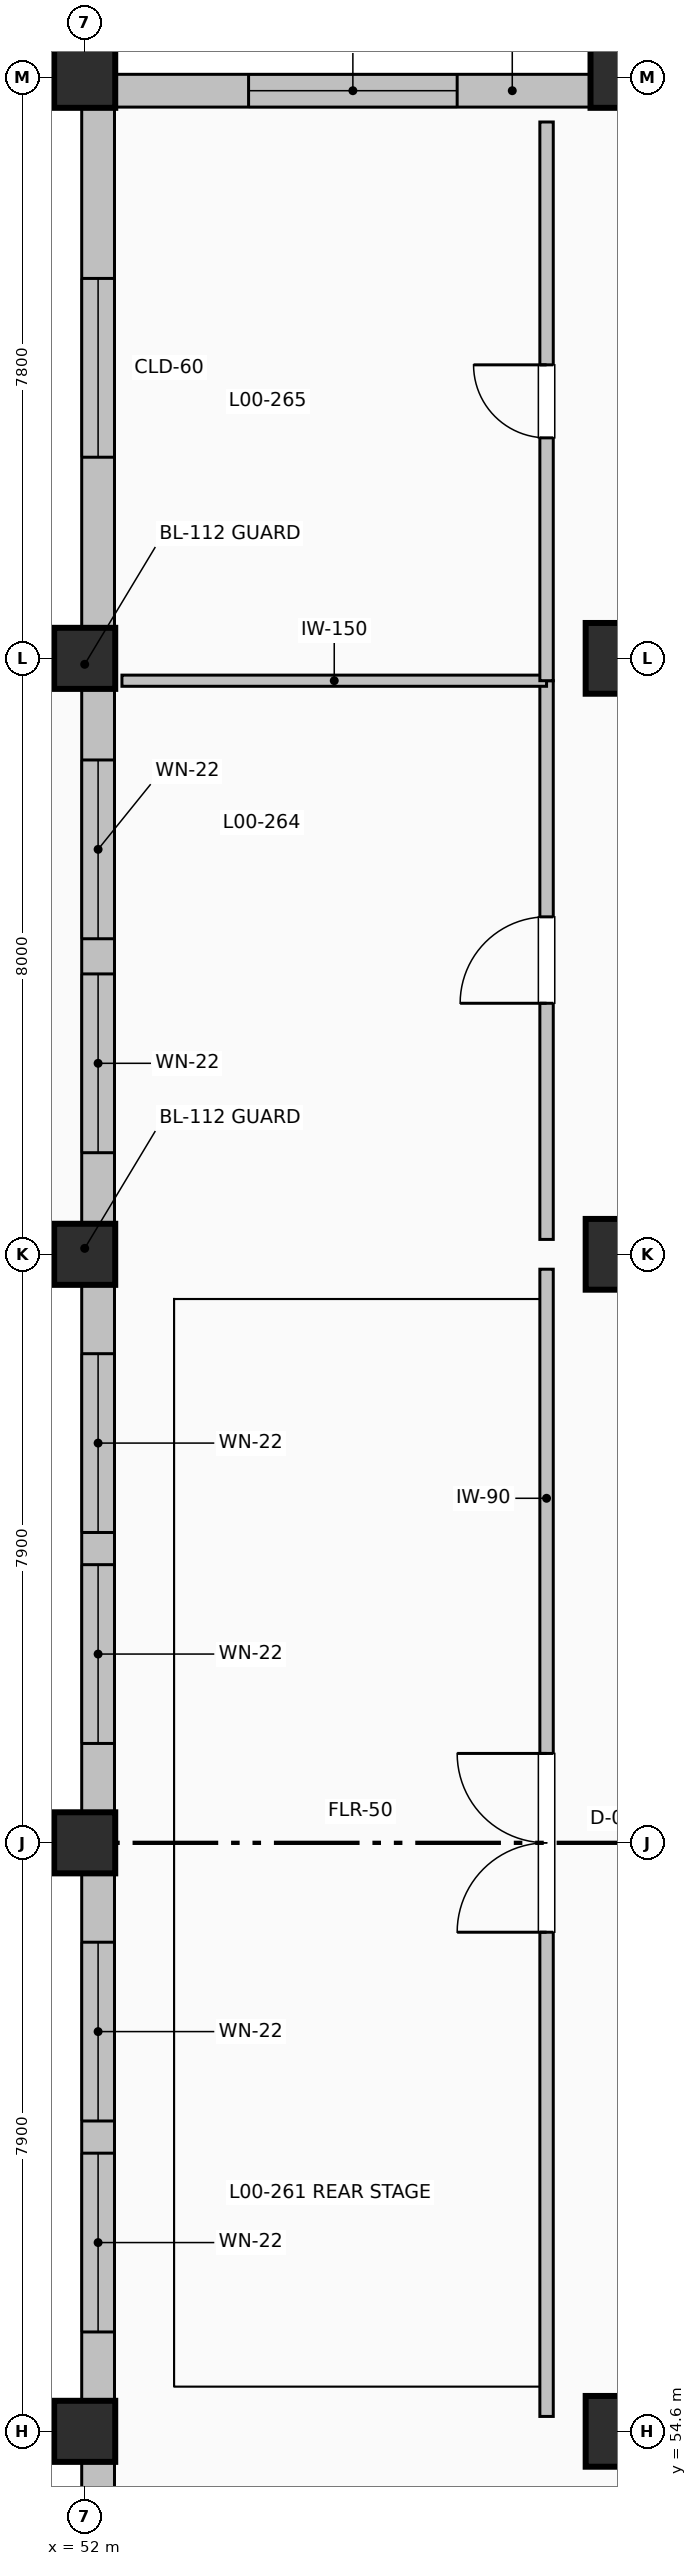
"""IFC4 building model, lengths in metres.
Left out: names, types, materials, properties, quantities, classifications, styles, units other than length and angle.
Written with IfcOpenShell. Run it as: python <this file> out.ifc"""

import sys

from ifc_helpers import new_model, si_unit, direction, frame, frame_2d, origin, origin_2d, place, context, subcontext, project, spatial, rectangle, extrude, element, fill, save


model = new_model("IFC4")
c1 = context("Model", 3, precision=1e-05, world=origin(), true_north=direction((0.0, 1.0)))
c2 = subcontext(c1, "Body", "Model", "MODEL_VIEW")
j1 = project(units=[si_unit("LENGTHUNIT", "METRE"), si_unit("PLANEANGLEUNIT", "RADIAN")], contexts=[c1])
p1 = place(None, origin())
s1 = spatial("IfcSite", under=j1, at=p1, CompositionType="ELEMENT")
p2 = place(p1, origin())
s2 = spatial("IfcBuilding", under=s1, at=p2, CompositionType="ELEMENT")
p3 = place(p2, origin())
s3 = spatial("IfcBuildingStorey", under=s2, at=p3, CompositionType="ELEMENT", Elevation=0.0)
for number, where, z_axis, x_axis in (
    (1, (52.0, 54.6, 0.0), (0.0, 0.0, 1.0), (1.0, 0.0, 0.0)),
    (2, (52.0, 62.5, 0.0), (0.0, 0.0, 1.0), (1.0, 0.0, 0.0)),
    (3, (52.0, 70.4, 0.0), (0.0, 0.0, 1.0), (1.0, 0.0, 0.0)),
    (4, (52.0, 78.4, 0.0), (0.0, 0.0, 1.0), (1.0, 0.0, 0.0)),
    (5, (52.0, 86.2, 0.0), (0.0, 0.0, 1.0), (1.0, 0.0, 0.0)),
):
    element("IfcColumn", number, at=place(p3, frame(where, z_axis=z_axis, x_axis=x_axis)), inside=s3, PredefinedType="COLUMN", context=c2, shape_type="SweptSolid", body=[
        extrude(rectangle(XDim=0.82, YDim=0.82, at=origin_2d()), origin(), (0.0, 0.0, 1.0), 5.4),
    ])
for number, where, z_axis, x_axis in (
    (6, (59.2, 54.6, 0.0), (0.0, 0.0, 1.0), (1.0, 0.0, 0.0)),
    (7, (59.2, 70.4, 0.0), (0.0, 0.0, 1.0), (1.0, 0.0, 0.0)),
    (8, (59.2, 78.4, 0.0), (0.0, 0.0, 1.0), (1.0, 0.0, 0.0)),
):
    element("IfcColumn", number, at=place(p3, frame(where, z_axis=z_axis, x_axis=x_axis)), inside=s3, PredefinedType="COLUMN", context=c2, shape_type="SweptSolid", body=[
        extrude(rectangle(XDim=0.95, YDim=0.95, at=origin_2d()), origin(), (0.0, 0.0, 1.0), 5.4),
    ])
p4 = place(p3, frame((59.2, 86.2, 0.0), z_axis=(0.0, 0.0, 1.0), x_axis=(1.0, 0.0, 0.0)))
e9 = element("IfcColumn", 9, at=p4, inside=s3, PredefinedType="COLUMN", context=c2, shape_type="SweptSolid", body=[
    extrude(rectangle(XDim=0.82, YDim=0.82, at=origin_2d()), origin(), (0.0, 0.0, 1.0), 5.4),
])
p5 = place(p3, frame((52.41, 86.02, 0.0), z_axis=(0.0, 0.0, 1.0), x_axis=(1.0, 0.0, 0.0)))
e10 = element("IfcWall", 10, at=p5, inside=s3, PredefinedType="SOLIDWALL", context=c2, shape_type="SweptSolid", body=[
    extrude(rectangle(XDim=6.38, YDim=0.44, at=frame_2d((3.19, 0.0))), origin(), (0.0, 0.0, 1.0), 4.342),
])
p6 = place(p5, frame((1.79, 0.0, 1.05)))
e11 = element("IfcOpeningElement", 11, at=p6, cuts=e10, PredefinedType="OPENING", context=c2, shape_type="SweptSolid", body=[
    extrude(rectangle(XDim=2.8, YDim=1.35, at=frame_2d((1.4, 0.675))), frame((0.0, 0.23, 0.0), z_axis=(0.0, -1.0, 0.0), x_axis=(1.0, 0.0, 0.0)), (0.0, 0.0, 1.0), 0.46),
])
p7 = place(p3, frame((52.18, 47.01, 0.0), z_axis=(0.0, 0.0, 1.0), x_axis=(0.0, 1.0, 0.0)))
e12 = element("IfcWall", 12, at=p7, inside=s3, PredefinedType="SOLIDWALL", context=c2, shape_type="SweptSolid", body=[
    extrude(rectangle(XDim=7.18, YDim=0.44, at=frame_2d((3.59, 0.0))), origin(), (0.0, 0.0, 1.0), 4.342),
])
p8 = place(p7, frame((2.39, 0.0, 0.0)))
e13 = element("IfcOpeningElement", 13, at=p8, cuts=e12, PredefinedType="OPENING", context=c2, shape_type="SweptSolid", body=[
    extrude(rectangle(XDim=2.4, YDim=2.4, at=frame_2d((1.2, 1.2))), frame((0.0, 0.23, 0.0), z_axis=(0.0, -1.0, 0.0), x_axis=(1.0, 0.0, 0.0)), (0.0, 0.0, 1.0), 0.46),
])
p9 = place(p3, frame((52.18, 55.01, 0.0), z_axis=(0.0, 0.0, 1.0), x_axis=(0.0, 1.0, 0.0)))
e14 = element("IfcWall", 14, at=p9, inside=s3, PredefinedType="SOLIDWALL", context=c2, shape_type="SweptSolid", body=[
    extrude(rectangle(XDim=7.08, YDim=0.44, at=frame_2d((3.54, 0.0))), origin(), (0.0, 0.0, 1.0), 4.342),
])
p10 = place(p9, frame((0.924, 0.0, 1.05)))
e15 = element("IfcOpeningElement", 15, at=p10, cuts=e14, PredefinedType="OPENING", context=c2, shape_type="SweptSolid", body=[
    extrude(rectangle(XDim=2.4, YDim=1.25, at=frame_2d((1.2, 0.625))), frame((0.0, 0.23, 0.0), z_axis=(0.0, -1.0, 0.0), x_axis=(1.0, 0.0, 0.0)), (0.0, 0.0, 1.0), 0.46),
])
p11 = place(p9, frame((3.756, 0.0, 1.05)))
e16 = element("IfcOpeningElement", 16, at=p11, cuts=e14, PredefinedType="OPENING", context=c2, shape_type="SweptSolid", body=[
    extrude(rectangle(XDim=2.4, YDim=1.25, at=frame_2d((1.2, 0.625))), frame((0.0, 0.23, 0.0), z_axis=(0.0, -1.0, 0.0), x_axis=(1.0, 0.0, 0.0)), (0.0, 0.0, 1.0), 0.46),
])
p12 = place(p3, frame((52.18, 62.91, 0.0), z_axis=(0.0, 0.0, 1.0), x_axis=(0.0, 1.0, 0.0)))
e17 = element("IfcWall", 17, at=p12, inside=s3, PredefinedType="SOLIDWALL", context=c2, shape_type="SweptSolid", body=[
    extrude(rectangle(XDim=7.08, YDim=0.44, at=frame_2d((3.54, 0.0))), origin(), (0.0, 0.0, 1.0), 4.342),
])
p13 = place(p12, frame((0.924, 0.0, 1.05)))
e18 = element("IfcOpeningElement", 18, at=p13, cuts=e17, PredefinedType="OPENING", context=c2, shape_type="SweptSolid", body=[
    extrude(rectangle(XDim=2.4, YDim=1.25, at=frame_2d((1.2, 0.625))), frame((0.0, 0.23, 0.0), z_axis=(0.0, -1.0, 0.0), x_axis=(1.0, 0.0, 0.0)), (0.0, 0.0, 1.0), 0.46),
])
p14 = place(p12, frame((3.756, 0.0, 1.05)))
e19 = element("IfcOpeningElement", 19, at=p14, cuts=e17, PredefinedType="OPENING", context=c2, shape_type="SweptSolid", body=[
    extrude(rectangle(XDim=2.4, YDim=1.25, at=frame_2d((1.2, 0.625))), frame((0.0, 0.23, 0.0), z_axis=(0.0, -1.0, 0.0), x_axis=(1.0, 0.0, 0.0)), (0.0, 0.0, 1.0), 0.46),
])
p15 = place(p3, frame((52.18, 70.81, 0.0), z_axis=(0.0, 0.0, 1.0), x_axis=(0.0, 1.0, 0.0)))
e20 = element("IfcWall", 20, at=p15, inside=s3, PredefinedType="SOLIDWALL", context=c2, shape_type="SweptSolid", body=[
    extrude(rectangle(XDim=7.18, YDim=0.44, at=frame_2d((3.59, 0.0))), origin(), (0.0, 0.0, 1.0), 4.342),
])
p16 = place(p15, frame((0.954, 0.0, 1.05)))
e21 = element("IfcOpeningElement", 21, at=p16, cuts=e20, PredefinedType="OPENING", context=c2, shape_type="SweptSolid", body=[
    extrude(rectangle(XDim=2.4, YDim=1.25, at=frame_2d((1.2, 0.625))), frame((0.0, 0.23, 0.0), z_axis=(0.0, -1.0, 0.0), x_axis=(1.0, 0.0, 0.0)), (0.0, 0.0, 1.0), 0.46),
])
p17 = place(p15, frame((3.826, 0.0, 1.05)))
e22 = element("IfcOpeningElement", 22, at=p17, cuts=e20, PredefinedType="OPENING", context=c2, shape_type="SweptSolid", body=[
    extrude(rectangle(XDim=2.4, YDim=1.25, at=frame_2d((1.2, 0.625))), frame((0.0, 0.23, 0.0), z_axis=(0.0, -1.0, 0.0), x_axis=(1.0, 0.0, 0.0)), (0.0, 0.0, 1.0), 0.46),
])
p18 = place(p3, frame((52.18, 78.81, 0.0), z_axis=(0.0, 0.0, 1.0), x_axis=(0.0, 1.0, 0.0)))
e23 = element("IfcWall", 23, at=p18, inside=s3, PredefinedType="SOLIDWALL", context=c2, shape_type="SweptSolid", body=[
    extrude(rectangle(XDim=6.98, YDim=0.44, at=frame_2d((3.49, 0.0))), origin(), (0.0, 0.0, 1.0), 4.342),
])
p19 = place(p18, frame((2.29, 0.0, 1.05)))
e24 = element("IfcOpeningElement", 24, at=p19, cuts=e23, PredefinedType="OPENING", context=c2, shape_type="SweptSolid", body=[
    extrude(rectangle(XDim=2.4, YDim=1.25, at=frame_2d((1.2, 0.625))), frame((0.0, 0.23, 0.0), z_axis=(0.0, -1.0, 0.0), x_axis=(1.0, 0.0, 0.0)), (0.0, 0.0, 1.0), 0.46),
])
p20 = place(p3, frame((58.2, 54.8, 0.0), z_axis=(0.0, 0.0, 1.0), x_axis=(0.0, 1.0, 0.0)))
e25 = element("IfcWall", 25, at=p20, inside=s3, PredefinedType="PARTITIONING", context=c2, shape_type="SweptSolid", body=[
    extrude(rectangle(XDim=15.4, YDim=0.18, at=frame_2d((7.7, 0.0))), origin(), (0.0, 0.0, 1.0), 5.092),
])
p21 = place(p20, frame((6.5, 0.0, 0.0)))
e26 = element("IfcOpeningElement", 26, at=p21, cuts=e25, PredefinedType="OPENING", context=c2, shape_type="SweptSolid", body=[
    extrude(rectangle(XDim=2.4, YDim=2.4, at=frame_2d((1.2, 1.2))), frame((0.0, 0.1, 0.0), z_axis=(0.0, -1.0, 0.0), x_axis=(1.0, 0.0, 0.0)), (0.0, 0.0, 1.0), 0.2),
])
p22 = place(p3, frame((58.2, 70.6, 0.0), z_axis=(0.0, 0.0, 1.0), x_axis=(0.0, 1.0, 0.0)))
e27 = element("IfcWall", 27, at=p22, inside=s3, PredefinedType="PARTITIONING", context=c2, shape_type="SweptSolid", body=[
    extrude(rectangle(XDim=7.5, YDim=0.18, at=frame_2d((3.75, 0.0))), origin(), (0.0, 0.0, 1.0), 5.092),
])
p23 = place(p22, frame((3.17, 0.0, 0.0)))
e28 = element("IfcOpeningElement", 28, at=p23, cuts=e27, PredefinedType="OPENING", context=c2, shape_type="SweptSolid", body=[
    extrude(rectangle(XDim=1.16, YDim=2.1, at=frame_2d((0.58, 1.05))), frame((0.0, 0.1, 0.0), z_axis=(0.0, -1.0, 0.0), x_axis=(1.0, 0.0, 0.0)), (0.0, 0.0, 1.0), 0.2),
])
p24 = place(p3, frame((52.5, 78.1, 0.0), z_axis=(0.0, 0.0, 1.0), x_axis=(1.0, 0.0, 0.0)))
e29 = element("IfcWall", 29, at=p24, inside=s3, PredefinedType="PARTITIONING", context=c2, shape_type="SweptSolid", body=[
    extrude(rectangle(XDim=5.7, YDim=0.15, at=frame_2d((2.85, 0.0))), origin(), (0.0, 0.0, 1.0), 5.092),
])
p25 = place(p3, frame((58.2, 78.1, 0.0), z_axis=(0.0, 0.0, 1.0), x_axis=(0.0, 1.0, 0.0)))
e30 = element("IfcWall", 30, at=p25, inside=s3, PredefinedType="PARTITIONING", context=c2, shape_type="SweptSolid", body=[
    extrude(rectangle(XDim=7.5, YDim=0.18, at=frame_2d((3.75, 0.0))), origin(), (0.0, 0.0, 1.0), 5.092),
])
p26 = place(p25, frame((3.26, 0.0, 0.0)))
e31 = element("IfcOpeningElement", 31, at=p26, cuts=e30, PredefinedType="OPENING", context=c2, shape_type="SweptSolid", body=[
    extrude(rectangle(XDim=0.98, YDim=2.08, at=frame_2d((0.49, 1.04))), frame((0.0, 0.1, 0.0), z_axis=(0.0, -1.0, 0.0), x_axis=(1.0, 0.0, 0.0)), (0.0, 0.0, 1.0), 0.2),
])
p27 = place(p6, origin())
e32 = element("IfcWindow", 32, at=p27, inside=s3, PartitioningType="SINGLE_PANEL", PredefinedType="WINDOW", context=c2, shape_type="SweptSolid", body=[
    extrude(rectangle(XDim=2.8, YDim=1.35, at=frame_2d((1.4, 0.675))), frame((0.0, 0.03, 0.0), z_axis=(0.0, -1.0, 0.0), x_axis=(1.0, 0.0, 0.0)), (0.0, 0.0, 1.0), 0.06),
])
fill(e11, e32)
p28 = place(p10, origin())
e33 = element("IfcWindow", 33, at=p28, inside=s3, PartitioningType="SINGLE_PANEL", PredefinedType="WINDOW", context=c2, shape_type="SweptSolid", body=[
    extrude(rectangle(XDim=2.4, YDim=1.25, at=frame_2d((1.2, 0.625))), frame((0.0, 0.03, 0.0), z_axis=(0.0, -1.0, 0.0), x_axis=(1.0, 0.0, 0.0)), (0.0, 0.0, 1.0), 0.06),
])
fill(e15, e33)
p29 = place(p11, origin())
e34 = element("IfcWindow", 34, at=p29, inside=s3, PartitioningType="SINGLE_PANEL", PredefinedType="WINDOW", context=c2, shape_type="SweptSolid", body=[
    extrude(rectangle(XDim=2.4, YDim=1.25, at=frame_2d((1.2, 0.625))), frame((0.0, 0.03, 0.0), z_axis=(0.0, -1.0, 0.0), x_axis=(1.0, 0.0, 0.0)), (0.0, 0.0, 1.0), 0.06),
])
fill(e16, e34)
p30 = place(p13, origin())
e35 = element("IfcWindow", 35, at=p30, inside=s3, PartitioningType="SINGLE_PANEL", PredefinedType="WINDOW", context=c2, shape_type="SweptSolid", body=[
    extrude(rectangle(XDim=2.4, YDim=1.25, at=frame_2d((1.2, 0.625))), frame((0.0, 0.03, 0.0), z_axis=(0.0, -1.0, 0.0), x_axis=(1.0, 0.0, 0.0)), (0.0, 0.0, 1.0), 0.06),
])
fill(e18, e35)
p31 = place(p14, origin())
e36 = element("IfcWindow", 36, at=p31, inside=s3, PartitioningType="SINGLE_PANEL", PredefinedType="WINDOW", context=c2, shape_type="SweptSolid", body=[
    extrude(rectangle(XDim=2.4, YDim=1.25, at=frame_2d((1.2, 0.625))), frame((0.0, 0.03, 0.0), z_axis=(0.0, -1.0, 0.0), x_axis=(1.0, 0.0, 0.0)), (0.0, 0.0, 1.0), 0.06),
])
fill(e19, e36)
p32 = place(p16, origin())
e37 = element("IfcWindow", 37, at=p32, inside=s3, PartitioningType="SINGLE_PANEL", PredefinedType="WINDOW", context=c2, shape_type="SweptSolid", body=[
    extrude(rectangle(XDim=2.4, YDim=1.25, at=frame_2d((1.2, 0.625))), frame((0.0, 0.03, 0.0), z_axis=(0.0, -1.0, 0.0), x_axis=(1.0, 0.0, 0.0)), (0.0, 0.0, 1.0), 0.06),
])
fill(e21, e37)
p33 = place(p17, origin())
e38 = element("IfcWindow", 38, at=p33, inside=s3, PartitioningType="SINGLE_PANEL", PredefinedType="WINDOW", context=c2, shape_type="SweptSolid", body=[
    extrude(rectangle(XDim=2.4, YDim=1.25, at=frame_2d((1.2, 0.625))), frame((0.0, 0.03, 0.0), z_axis=(0.0, -1.0, 0.0), x_axis=(1.0, 0.0, 0.0)), (0.0, 0.0, 1.0), 0.06),
])
fill(e22, e38)
p34 = place(p19, origin())
e39 = element("IfcWindow", 39, at=p34, inside=s3, PartitioningType="SINGLE_PANEL", PredefinedType="WINDOW", context=c2, shape_type="SweptSolid", body=[
    extrude(rectangle(XDim=2.4, YDim=1.25, at=frame_2d((1.2, 0.625))), frame((0.0, 0.03, 0.0), z_axis=(0.0, -1.0, 0.0), x_axis=(1.0, 0.0, 0.0)), (0.0, 0.0, 1.0), 0.06),
])
fill(e24, e39)
p35 = place(p21, origin())
e40 = element("IfcDoor", 40, at=p35, inside=s3, OperationType="DOUBLE_DOOR_SINGLE_SWING", PredefinedType="DOOR", context=c2, shape_type="SweptSolid", body=[
    extrude(rectangle(XDim=2.4, YDim=2.4, at=frame_2d((1.2, 1.2))), frame((0.0, 0.025, 0.0), z_axis=(0.0, -1.0, 0.0), x_axis=(1.0, 0.0, 0.0)), (0.0, 0.0, 1.0), 0.05),
])
fill(e26, e40)
p36 = place(p23, origin())
e41 = element("IfcDoor", 41, at=p36, inside=s3, OperationType="SINGLE_SWING_LEFT", PredefinedType="DOOR", context=c2, shape_type="SweptSolid", body=[
    extrude(rectangle(XDim=1.16, YDim=2.1, at=frame_2d((0.58, 1.05))), frame((0.0, 0.025, 0.0), z_axis=(0.0, -1.0, 0.0), x_axis=(1.0, 0.0, 0.0)), (0.0, 0.0, 1.0), 0.05),
])
fill(e28, e41)
p37 = place(p26, origin())
e42 = element("IfcDoor", 42, at=p37, inside=s3, OperationType="SINGLE_SWING_RIGHT", PredefinedType="DOOR", context=c2, shape_type="SweptSolid", body=[
    extrude(rectangle(XDim=0.98, YDim=2.08, at=frame_2d((0.49, 1.04))), frame((0.0, 0.025, 0.0), z_axis=(0.0, -1.0, 0.0), x_axis=(1.0, 0.0, 0.0)), (0.0, 0.0, 1.0), 0.05),
])
fill(e31, e42)
save(model, sys.argv[1])
